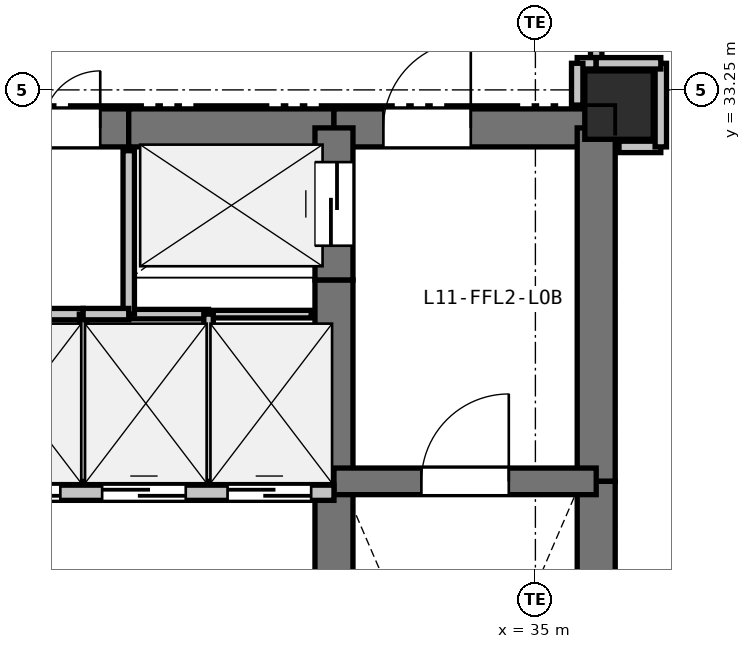
"""IFC4 building model, lengths in metres.
Left out: names, types, materials, properties, quantities, classifications, styles, units other than length and angle.
Written with IfcOpenShell. Run it as: python <this file> out.ifc"""

import sys

from ifc_helpers import new_model, si_unit, direction, frame, frame_2d, origin, origin_2d, place, context, subcontext, project, spatial, rectangle, extrude, element, fill, save


model = new_model("IFC4")
c1 = context("Model", 3, precision=1e-05, world=origin(), true_north=direction((0.0, 1.0)))
c2 = subcontext(c1, "Body", "Model", "MODEL_VIEW")
j1 = project(units=[si_unit("LENGTHUNIT", "METRE"), si_unit("PLANEANGLEUNIT", "RADIAN")], contexts=[c1])
p1 = place(None, origin())
s1 = spatial("IfcSite", under=j1, at=p1, CompositionType="ELEMENT")
p2 = place(p1, origin())
s2 = spatial("IfcBuilding", under=s1, at=p2, CompositionType="ELEMENT")
p3 = place(p2, frame((0.0, 0.0, 42.3)))
s3 = spatial("IfcBuildingStorey", under=s2, at=p3, CompositionType="ELEMENT", Elevation=42.3)
p4 = place(p3, frame((36.1, 33.05, 0.0), z_axis=(0.0, 0.0, 1.0), x_axis=(1.0, 0.0, 0.0)))
e1 = element("IfcColumn", 1, at=p4, inside=s3, PredefinedType="COLUMN", context=c2, shape_type="SweptSolid", body=[
    extrude(rectangle(XDim=0.9, YDim=0.9, at=origin_2d()), origin(), (0.0, 0.0, 1.0), 3.3),
])
p5 = place(p3, frame((27.4, 32.75, 0.0), z_axis=(0.0, 0.0, 1.0), x_axis=(1.0, 0.0, 0.0)))
e2 = element("IfcWall", 2, at=p5, inside=s3, PredefinedType="SHEAR", context=c2, shape_type="SweptSolid", body=[
    extrude(rectangle(XDim=2.25, YDim=0.5, at=frame_2d((1.125, 0.0))), origin(), (0.0, 0.0, 1.0), 3.04),
])
p6 = place(p5, frame((0.375, 0.0, 0.0)))
e3 = element("IfcOpeningElement", 3, at=p6, cuts=e2, PredefinedType="OPENING", context=c2, shape_type="SweptSolid", body=[
    extrude(rectangle(XDim=1.5, YDim=2.2, at=frame_2d((0.75, 1.1))), frame((0.0, 0.26, 0.0), z_axis=(0.0, -1.0, 0.0), x_axis=(1.0, 0.0, 0.0)), (0.0, 0.0, 1.0), 0.52),
])
p7 = place(p3, frame((29.65, 32.75, 0.0), z_axis=(0.0, 0.0, 1.0), x_axis=(1.0, 0.0, 0.0)))
e4 = element("IfcWall", 4, at=p7, inside=s3, PredefinedType="SHEAR", context=c2, shape_type="SweptSolid", body=[
    extrude(rectangle(XDim=2.7, YDim=0.5, at=frame_2d((1.35, 0.0))), origin(), (0.0, 0.0, 1.0), 3.04),
])
p8 = place(p3, frame((32.35, 32.75, 0.0), z_axis=(0.0, 0.0, 1.0), x_axis=(1.0, 0.0, 0.0)))
e5 = element("IfcWall", 5, at=p8, inside=s3, PredefinedType="SHEAR", context=c2, shape_type="SweptSolid", body=[
    extrude(rectangle(XDim=3.45, YDim=0.5, at=frame_2d((1.725, 0.0))), origin(), (0.0, 0.0, 1.0), 3.04),
])
p9 = place(p8, frame((0.65, 0.0, 0.0)))
e6 = element("IfcOpeningElement", 6, at=p9, cuts=e5, PredefinedType="OPENING", context=c2, shape_type="SweptSolid", body=[
    extrude(rectangle(XDim=1.15, YDim=2.15, at=frame_2d((0.575, 1.075))), frame((0.0, 0.26, 0.0), z_axis=(0.0, -1.0, 0.0), x_axis=(1.0, 0.0, 0.0)), (0.0, 0.0, 1.0), 0.52),
])
p10 = place(p3, frame((35.8, 32.75, 0.0), z_axis=(0.0, 0.0, 1.0), x_axis=(0.0, -1.0, 0.0)))
e7 = element("IfcWall", 7, at=p10, inside=s3, PredefinedType="SHEAR", context=c2, shape_type="SweptSolid", body=[
    extrude(rectangle(XDim=4.65, YDim=0.5, at=frame_2d((2.325, 0.0))), origin(), (0.0, 0.0, 1.0), 3.04),
])
p11 = place(p3, frame((35.8, 28.1, 0.0), z_axis=(0.0, 0.0, 1.0), x_axis=(0.0, -1.0, 0.0)))
e8 = element("IfcWall", 8, at=p11, inside=s3, PredefinedType="SHEAR", context=c2, shape_type="SweptSolid", body=[
    extrude(rectangle(XDim=7.35, YDim=0.5, at=frame_2d((3.675, 0.0))), origin(), (0.0, 0.0, 1.0), 3.04),
])
p12 = place(p3, frame((32.35, 25.55, 0.0), z_axis=(0.0, 0.0, 1.0), x_axis=(0.0, 1.0, 0.0)))
e9 = element("IfcWall", 9, at=p12, inside=s3, PredefinedType="SHEAR", context=c2, shape_type="SweptSolid", body=[
    extrude(rectangle(XDim=2.4, YDim=0.5, at=frame_2d((1.2, 0.0))), origin(), (0.0, 0.0, 1.0), 3.04),
])
p13 = place(p3, frame((32.35, 27.95, 0.0), z_axis=(0.0, 0.0, 1.0), x_axis=(0.0, 1.0, 0.0)))
e10 = element("IfcWall", 10, at=p13, inside=s3, PredefinedType="SHEAR", context=c2, shape_type="SweptSolid", body=[
    extrude(rectangle(XDim=2.8, YDim=0.5, at=frame_2d((1.4, 0.0))), origin(), (0.0, 0.0, 1.0), 3.04),
])
p14 = place(p3, frame((32.35, 30.75, 0.0), z_axis=(0.0, 0.0, 1.0), x_axis=(0.0, 1.0, 0.0)))
e11 = element("IfcWall", 11, at=p14, inside=s3, PredefinedType="SHEAR", context=c2, shape_type="SweptSolid", body=[
    extrude(rectangle(XDim=2.0, YDim=0.5, at=frame_2d((1.0, 0.0))), origin(), (0.0, 0.0, 1.0), 3.04),
])
p15 = place(p14, frame((0.45, 0.0, 0.0)))
e12 = element("IfcOpeningElement", 12, at=p15, cuts=e11, PredefinedType="OPENING", context=c2, shape_type="SweptSolid", body=[
    extrude(rectangle(XDim=1.1, YDim=2.15, at=frame_2d((0.55, 1.075))), frame((0.0, 0.26, 0.0), z_axis=(0.0, -1.0, 0.0), x_axis=(1.0, 0.0, 0.0)), (0.0, 0.0, 1.0), 0.52),
])
p16 = place(p3, frame((32.35, 28.1, 0.0), z_axis=(0.0, 0.0, 1.0), x_axis=(1.0, 0.0, 0.0)))
e13 = element("IfcWall", 13, at=p16, inside=s3, PredefinedType="SHEAR", context=c2, shape_type="SweptSolid", body=[
    extrude(rectangle(XDim=3.45, YDim=0.35, at=frame_2d((1.725, 0.0))), origin(), (0.0, 0.0, 1.0), 3.04),
])
p17 = place(p16, frame((1.15, 0.0, 0.0)))
e14 = element("IfcOpeningElement", 14, at=p17, cuts=e13, PredefinedType="OPENING", context=c2, shape_type="SweptSolid", body=[
    extrude(rectangle(XDim=1.15, YDim=2.15, at=frame_2d((0.575, 1.075))), frame((0.0, 0.185, 0.0), z_axis=(0.0, -1.0, 0.0), x_axis=(1.0, 0.0, 0.0)), (0.0, 0.0, 1.0), 0.37),
])
p18 = place(p3, frame((27.4, 27.95, 0.0), z_axis=(0.0, 0.0, 1.0), x_axis=(1.0, 0.0, 0.0)))
e15 = element("IfcWall", 15, at=p18, inside=s3, PredefinedType="PARTITIONING", context=c2, shape_type="SweptSolid", body=[
    extrude(rectangle(XDim=4.95, YDim=0.2, at=frame_2d((2.475, 0.0))), origin(), (0.0, 0.0, 1.0), 3.04),
])
p19 = place(p18, frame((0.25, 0.0, 0.0)))
e16 = element("IfcOpeningElement", 16, at=p19, cuts=e15, PredefinedType="OPENING", context=c2, shape_type="SweptSolid", body=[
    extrude(rectangle(XDim=1.1, YDim=2.15, at=frame_2d((0.55, 1.075))), frame((0.0, 0.11, 0.0), z_axis=(0.0, -1.0, 0.0), x_axis=(1.0, 0.0, 0.0)), (0.0, 0.0, 1.0), 0.22),
])
p20 = place(p18, frame((1.9, 0.0, 0.0)))
e17 = element("IfcOpeningElement", 17, at=p20, cuts=e15, PredefinedType="OPENING", context=c2, shape_type="SweptSolid", body=[
    extrude(rectangle(XDim=1.1, YDim=2.15, at=frame_2d((0.55, 1.075))), frame((0.0, 0.11, 0.0), z_axis=(0.0, -1.0, 0.0), x_axis=(1.0, 0.0, 0.0)), (0.0, 0.0, 1.0), 0.22),
])
p21 = place(p18, frame((3.55, 0.0, 0.0)))
e18 = element("IfcOpeningElement", 18, at=p21, cuts=e15, PredefinedType="OPENING", context=c2, shape_type="SweptSolid", body=[
    extrude(rectangle(XDim=1.1, YDim=2.15, at=frame_2d((0.55, 1.075))), frame((0.0, 0.11, 0.0), z_axis=(0.0, -1.0, 0.0), x_axis=(1.0, 0.0, 0.0)), (0.0, 0.0, 1.0), 0.22),
])
p22 = place(p3, frame((32.05, 30.3, 0.0), z_axis=(0.0, 0.0, 1.0), x_axis=(-1.0, 0.0, 0.0)))
e19 = element("IfcWall", 19, at=p22, inside=s3, PredefinedType="PARTITIONING", context=c2, shape_type="SweptSolid", body=[
    extrude(rectangle(XDim=1.35, YDim=0.1, at=frame_2d((0.675, 0.0))), origin(), (0.0, 0.0, 1.0), 3.04),
])
p23 = place(p3, frame((30.7, 30.3, 0.0), z_axis=(0.0, 0.0, 1.0), x_axis=(-1.0, 0.0, 0.0)))
e20 = element("IfcWall", 20, at=p23, inside=s3, PredefinedType="PARTITIONING", context=c2, shape_type="SweptSolid", body=[
    extrude(rectangle(XDim=1.05, YDim=0.125, at=frame_2d((0.525, 0.0))), origin(), (0.0, 0.0, 1.0), 3.04),
])
p24 = place(p3, frame((29.65, 30.3, 0.0), z_axis=(0.0, 0.0, 1.0), x_axis=(0.0, 1.0, 0.0)))
e21 = element("IfcWall", 21, at=p24, inside=s3, PredefinedType="PARTITIONING", context=c2, shape_type="SweptSolid", body=[
    extrude(rectangle(XDim=2.15, YDim=0.15, at=frame_2d((1.075, 0.0))), origin(), (0.0, 0.0, 1.0), 3.04),
])
p25 = place(p3, frame((27.4, 30.3, 0.0), z_axis=(0.0, 0.0, 1.0), x_axis=(1.0, 0.0, 0.0)))
e22 = element("IfcWall", 22, at=p25, inside=s3, PredefinedType="PARTITIONING", context=c2, shape_type="SweptSolid", body=[
    extrude(rectangle(XDim=1.65, YDim=0.15, at=frame_2d((0.825, 0.0))), origin(), (0.0, 0.0, 1.0), 3.04),
])
p26 = place(p3, frame((29.05, 30.3, 0.0), z_axis=(0.0, 0.0, 1.0), x_axis=(0.0, -1.0, 0.0)))
e23 = element("IfcWall", 23, at=p26, inside=s3, PredefinedType="PARTITIONING", context=c2, shape_type="SweptSolid", body=[
    extrude(rectangle(XDim=2.2, YDim=0.1, at=frame_2d((1.1, 0.0))), origin(), (0.0, 0.0, 1.0), 3.04),
])
p27 = place(p3, frame((29.05, 30.3, 0.0), z_axis=(0.0, 0.0, 1.0), x_axis=(1.0, 0.0, 0.0)))
e24 = element("IfcWall", 24, at=p27, inside=s3, PredefinedType="PARTITIONING", context=c2, shape_type="SweptSolid", body=[
    extrude(rectangle(XDim=0.6, YDim=0.15, at=frame_2d((0.3, 0.0))), origin(), (0.0, 0.0, 1.0), 3.04),
])
p28 = place(p3, frame((30.7, 30.3, 0.0), z_axis=(0.0, 0.0, 1.0), x_axis=(0.0, -1.0, 0.0)))
e25 = element("IfcWall", 25, at=p28, inside=s3, PredefinedType="PARTITIONING", context=c2, shape_type="SweptSolid", body=[
    extrude(rectangle(XDim=2.2, YDim=0.125, at=frame_2d((1.1, 0.0))), origin(), (0.0, 0.0, 1.0), 3.04),
])
p29 = place(p3, frame((35.8, 35.35, 0.0), z_axis=(0.0, 0.0, 1.0), x_axis=(0.0, -1.0, 0.0)))
e26 = element("IfcWall", 26, at=p29, inside=s3, PredefinedType="PARTITIONING", context=c2, shape_type="SweptSolid", body=[
    extrude(rectangle(XDim=1.75, YDim=0.15, at=frame_2d((0.875, 0.0))), origin(), (0.0, 0.0, 1.0), 3.04),
])
p30 = place(p29, frame((0.375, 0.0, 0.0)))
e27 = element("IfcOpeningElement", 27, at=p30, cuts=e26, PredefinedType="OPENING", context=c2, shape_type="SweptSolid", body=[
    extrude(rectangle(XDim=1.0, YDim=2.15, at=frame_2d((0.5, 1.075))), frame((0.0, 0.085, 0.0), z_axis=(0.0, -1.0, 0.0), x_axis=(1.0, 0.0, 0.0)), (0.0, 0.0, 1.0), 0.17),
])
p31 = place(p3, frame((35.8, 33.6, 0.0), z_axis=(0.0, 0.0, 1.0), x_axis=(-1.0, 0.0, 0.0)))
e28 = element("IfcWall", 28, at=p31, inside=s3, PredefinedType="PARTITIONING", context=c2, shape_type="SweptSolid", body=[
    extrude(rectangle(XDim=0.25, YDim=0.15, at=frame_2d((0.125, 0.0))), origin(), (0.0, 0.0, 1.0), 3.04),
])
p32 = place(p3, frame((35.55, 33.6, 0.0), z_axis=(0.0, 0.0, 1.0), x_axis=(0.0, -1.0, 0.0)))
e29 = element("IfcWall", 29, at=p32, inside=s3, PredefinedType="PARTITIONING", context=c2, shape_type="SweptSolid", body=[
    extrude(rectangle(XDim=0.55, YDim=0.15, at=frame_2d((0.275, 0.0))), origin(), (0.0, 0.0, 1.0), 2.488),
])
p33 = place(p3, frame((36.1, 32.5, 0.0), z_axis=(0.0, 0.0, 1.0), x_axis=(1.0, 0.0, 0.0)))
e30 = element("IfcWall", 30, at=p33, inside=s3, PredefinedType="PARTITIONING", context=c2, shape_type="SweptSolid", body=[
    extrude(rectangle(XDim=0.55, YDim=0.15, at=frame_2d((0.275, 0.0))), origin(), (0.0, 0.0, 1.0), 2.488),
])
p34 = place(p3, frame((36.65, 32.5, 0.0), z_axis=(0.0, 0.0, 1.0), x_axis=(0.0, 1.0, 0.0)))
e31 = element("IfcWall", 31, at=p34, inside=s3, PredefinedType="PARTITIONING", context=c2, shape_type="SweptSolid", body=[
    extrude(rectangle(XDim=1.1, YDim=0.15, at=frame_2d((0.55, 0.0))), origin(), (0.0, 0.0, 1.0), 2.337),
])
p35 = place(p3, frame((36.65, 33.6, 0.0), z_axis=(0.0, 0.0, 1.0), x_axis=(-1.0, 0.0, 0.0)))
e32 = element("IfcWall", 32, at=p35, inside=s3, PredefinedType="PARTITIONING", context=c2, shape_type="SweptSolid", body=[
    extrude(rectangle(XDim=0.85, YDim=0.15, at=frame_2d((0.425, 0.0))), origin(), (0.0, 0.0, 1.0), 2.337),
])
p36 = place(p19, origin())
e33 = element("IfcDoor", 33, at=p36, inside=s3, OperationType="SLIDING_TO_LEFT", PredefinedType="DOOR", context=c2, shape_type="SweptSolid", body=[
    extrude(rectangle(XDim=1.1, YDim=2.15, at=frame_2d((0.55, 1.075))), frame((0.0, 0.025, 0.0), z_axis=(0.0, -1.0, 0.0), x_axis=(1.0, 0.0, 0.0)), (0.0, 0.0, 1.0), 0.05),
])
fill(e16, e33)
p37 = place(p20, origin())
e34 = element("IfcDoor", 34, at=p37, inside=s3, OperationType="SLIDING_TO_LEFT", PredefinedType="DOOR", context=c2, shape_type="SweptSolid", body=[
    extrude(rectangle(XDim=1.1, YDim=2.15, at=frame_2d((0.55, 1.075))), frame((0.0, 0.025, 0.0), z_axis=(0.0, -1.0, 0.0), x_axis=(1.0, 0.0, 0.0)), (0.0, 0.0, 1.0), 0.05),
])
fill(e17, e34)
p38 = place(p21, origin())
e35 = element("IfcDoor", 35, at=p38, inside=s3, OperationType="SLIDING_TO_LEFT", PredefinedType="DOOR", context=c2, shape_type="SweptSolid", body=[
    extrude(rectangle(XDim=1.1, YDim=2.15, at=frame_2d((0.55, 1.075))), frame((0.0, 0.025, 0.0), z_axis=(0.0, -1.0, 0.0), x_axis=(1.0, 0.0, 0.0)), (0.0, 0.0, 1.0), 0.05),
])
fill(e18, e35)
p39 = place(p15, origin())
e36 = element("IfcDoor", 36, at=p39, inside=s3, OperationType="SLIDING_TO_LEFT", PredefinedType="DOOR", context=c2, shape_type="SweptSolid", body=[
    extrude(rectangle(XDim=1.1, YDim=2.15, at=frame_2d((0.55, 1.075))), frame((0.0, 0.025, 0.0), z_axis=(0.0, -1.0, 0.0), x_axis=(1.0, 0.0, 0.0)), (0.0, 0.0, 1.0), 0.05),
])
fill(e12, e36)
p40 = place(p17, origin())
e37 = element("IfcDoor", 37, at=p40, inside=s3, OperationType="SINGLE_SWING_RIGHT", PredefinedType="DOOR", context=c2, shape_type="SweptSolid", body=[
    extrude(rectangle(XDim=1.15, YDim=2.15, at=frame_2d((0.575, 1.075))), frame((0.0, 0.025, 0.0), z_axis=(0.0, -1.0, 0.0), x_axis=(1.0, 0.0, 0.0)), (0.0, 0.0, 1.0), 0.05),
])
fill(e14, e37)
p41 = place(p9, origin())
e38 = element("IfcDoor", 38, at=p41, inside=s3, OperationType="SINGLE_SWING_RIGHT", PredefinedType="DOOR", context=c2, shape_type="SweptSolid", body=[
    extrude(rectangle(XDim=1.15, YDim=2.15, at=frame_2d((0.575, 1.075))), frame((0.0, 0.025, 0.0), z_axis=(0.0, -1.0, 0.0), x_axis=(1.0, 0.0, 0.0)), (0.0, 0.0, 1.0), 0.05),
])
fill(e6, e38)
p42 = place(p6, origin())
e39 = element("IfcDoor", 39, at=p42, inside=s3, OperationType="DOUBLE_DOOR_SINGLE_SWING", PredefinedType="DOOR", context=c2, shape_type="SweptSolid", body=[
    extrude(rectangle(XDim=1.5, YDim=2.2, at=frame_2d((0.75, 1.1))), frame((0.0, 0.025, 0.0), z_axis=(0.0, -1.0, 0.0), x_axis=(1.0, 0.0, 0.0)), (0.0, 0.0, 1.0), 0.05),
])
fill(e3, e39)
save(model, sys.argv[1])
